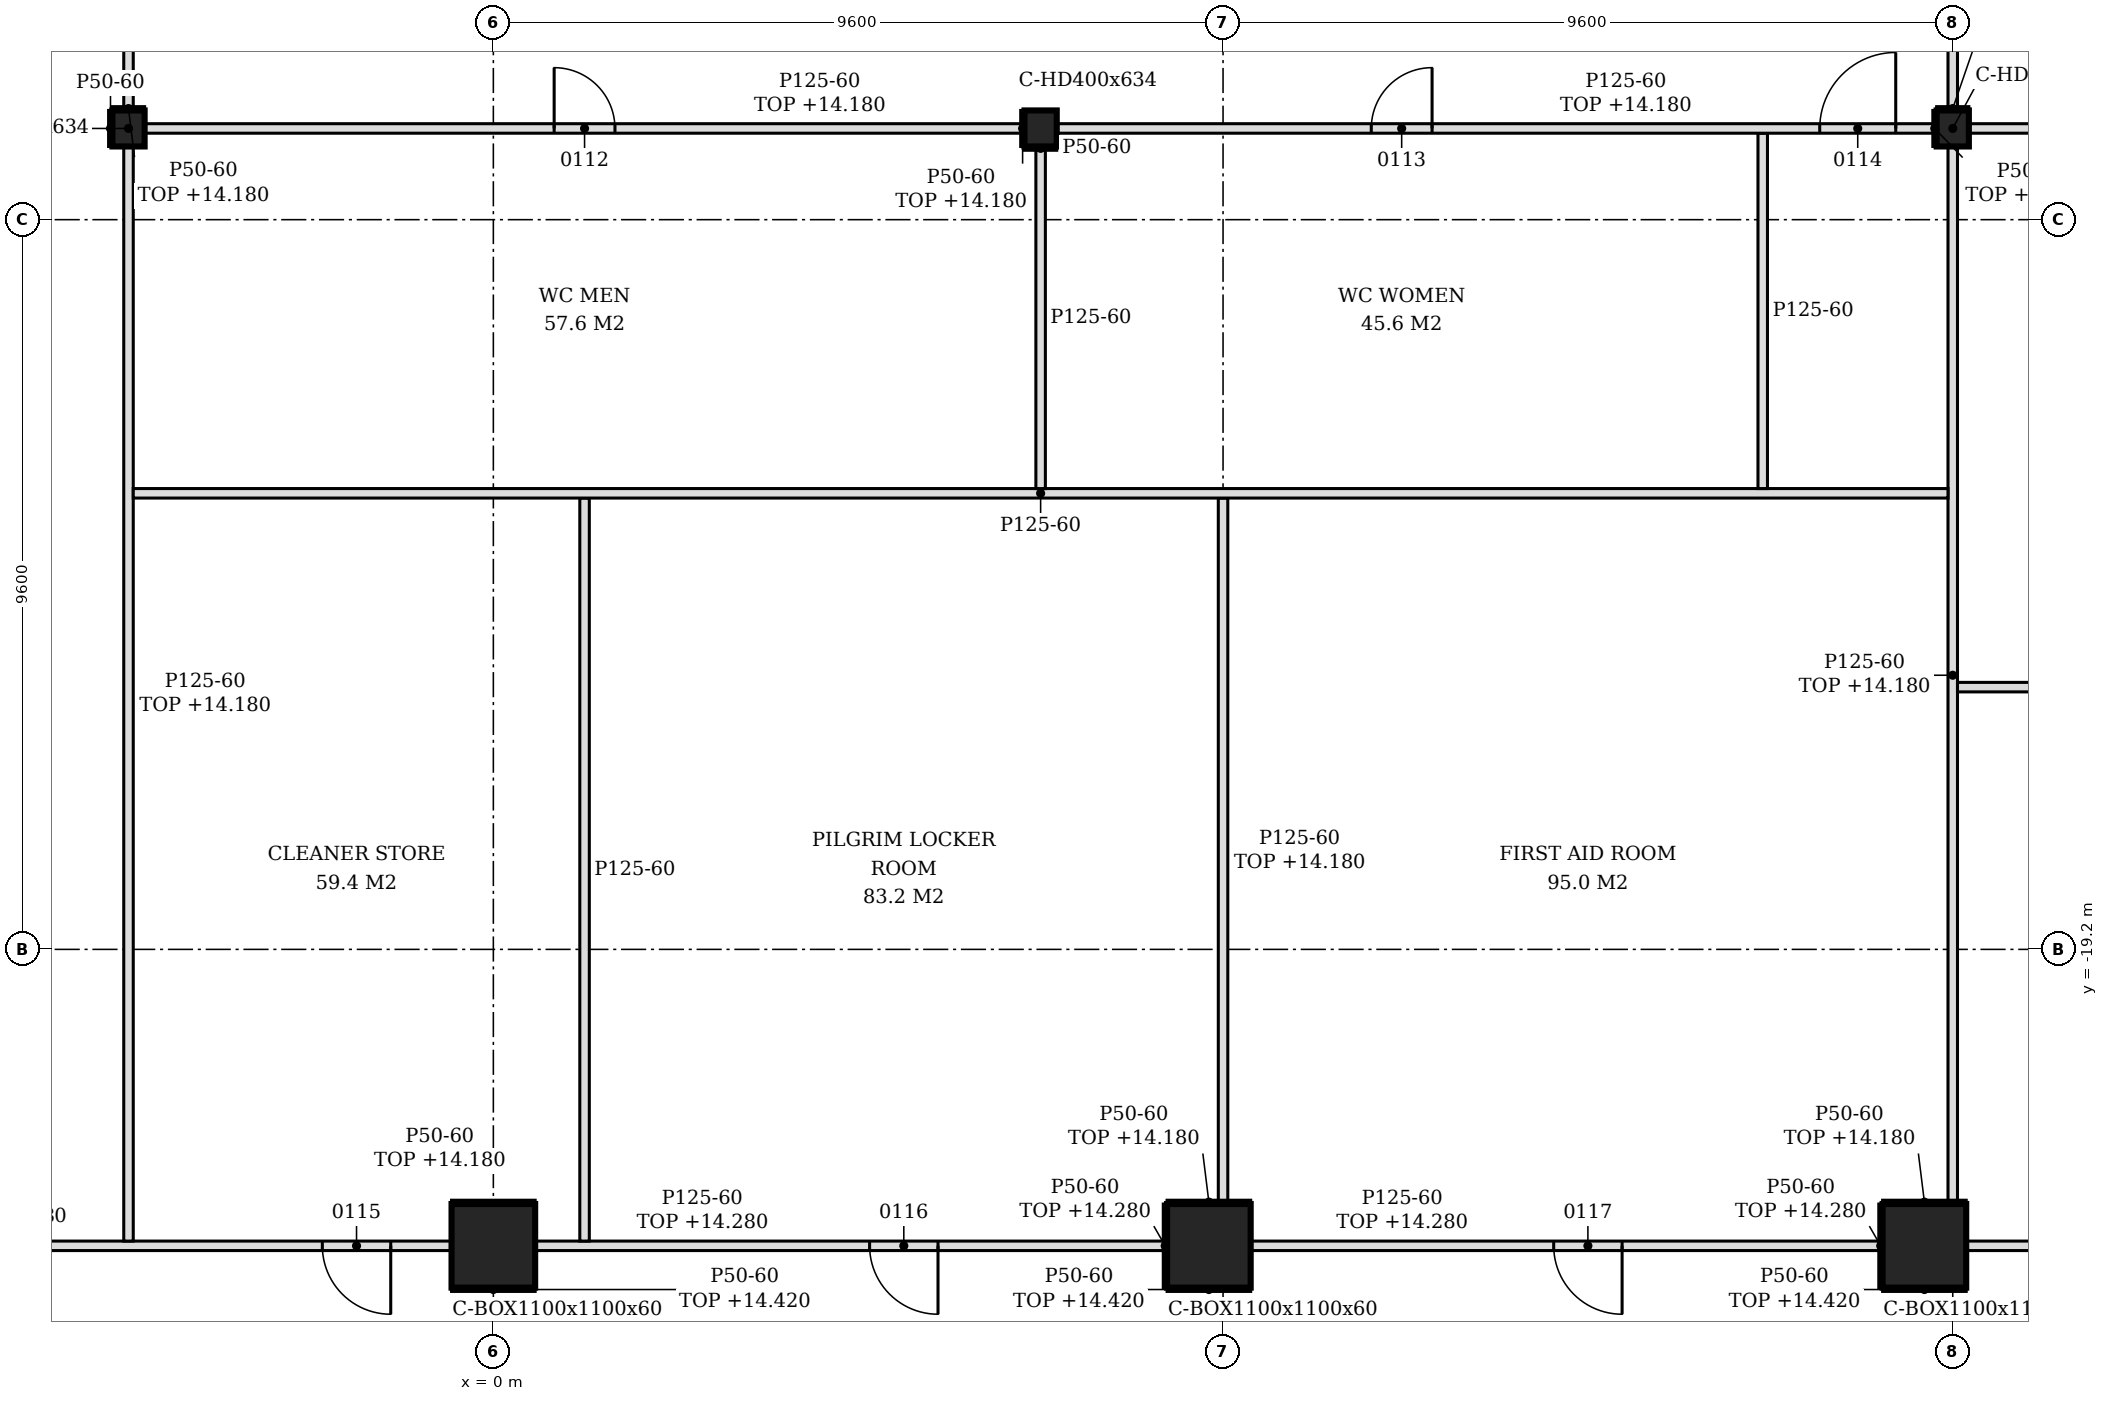
"""IFC4 building model, lengths in metres.
Left out: names, types, materials, properties, quantities, classifications, styles, units other than length and angle.
Written with IfcOpenShell. Run it as: python <this file> out.ifc"""

import sys

from ifc_helpers import new_model, si_unit, direction, frame, frame_2d, origin, origin_2d, place, context, subcontext, project, spatial, polyline, rectangle, hollow_rectangle, i_section, outline, extrude, element, fill, save


model = new_model("IFC4")
c1 = context("Model", 3, precision=1e-05, world=origin(), true_north=direction((0.0, 1.0)))
c2 = subcontext(c1, "Body", "Model", "MODEL_VIEW")
j1 = project(units=[si_unit("LENGTHUNIT", "METRE"), si_unit("PLANEANGLEUNIT", "RADIAN")], contexts=[c1])
p1 = place(None, origin())
s1 = spatial("IfcSite", under=j1, at=p1, CompositionType="ELEMENT")
p2 = place(p1, origin())
s2 = spatial("IfcBuilding", under=s1, at=p2, CompositionType="ELEMENT")
p3 = place(p2, frame((0.0, 0.0, 9.0)))
s3 = spatial("IfcBuildingStorey", under=s2, at=p3, CompositionType="ELEMENT", Elevation=9.0)
for number, where, z_axis, x_axis in (
    (1, (0.0, -23.1, -0.2), (0.0, 0.0, 1.0), (1.0, 0.0, 0.0)),
    (2, (9.414, -23.1, -0.2), (0.0, 0.0, 1.0), (1.0, 0.0, 0.0)),
    (3, (18.827, -23.1, -0.2), (0.0, 0.0, 1.0), (1.0, 0.0, 0.0)),
):
    element("IfcColumn", number, at=place(p3, frame(where, z_axis=z_axis, x_axis=x_axis)), inside=s3, PredefinedType="COLUMN", context=c2, shape_type="SweptSolid", body=[
        extrude(hollow_rectangle(XDim=1.1, YDim=1.1, WallThickness=0.06, at=origin_2d()), origin(), (0.0, 0.0, 1.0), 6.0),
    ])
for number, where, z_axis, x_axis in (
    (4, (-4.8, -8.4, -0.2), (0.0, 0.0, 1.0), (1.0, 0.0, 0.0)),
    (5, (7.2, -8.4, -0.2), (0.0, 0.0, 1.0), (1.0, 0.0, 0.0)),
    (6, (19.2, -8.4, -0.2), (0.0, 0.0, 1.0), (1.0, 0.0, 0.0)),
):
    element("IfcColumn", number, at=place(p3, frame(where, z_axis=z_axis, x_axis=x_axis)), inside=s3, PredefinedType="COLUMN", context=c2, shape_type="SweptSolid", body=[
        extrude(i_section(OverallWidth=0.424, OverallDepth=0.474, WebThickness=0.048, FlangeThickness=0.077, FilletRadius=0.015, at=origin_2d()), origin(), (0.0, 0.0, 1.0), 6.0),
    ])
p4 = place(p3, frame((-8.864, -23.1, 0.0), z_axis=(0.0, 0.0, 1.0), x_axis=(1.0, 0.0, 0.0)))
e7 = element("IfcWall", 7, at=p4, inside=s3, PredefinedType="PARTITIONING", context=c2, shape_type="SweptSolid", body=[
    extrude(rectangle(XDim=8.313, YDim=0.125, at=frame_2d((4.157, 0.0))), origin(), (0.0, 0.0, 1.0), 5.28),
])
p5 = place(p4, frame((6.614, 0.0, 0.0)))
e8 = element("IfcOpeningElement", 8, at=p5, cuts=e7, PredefinedType="OPENING", context=c2, shape_type="SweptSolid", body=[
    extrude(rectangle(XDim=0.9, YDim=2.1, at=frame_2d((0.45, 1.05))), frame((0.0, 0.073, 0.0), z_axis=(0.0, -1.0, 0.0), x_axis=(1.0, 0.0, 0.0)), (0.0, 0.0, 1.0), 0.145),
])
p6 = place(p3, frame((0.55, -23.1, 0.0), z_axis=(0.0, 0.0, 1.0), x_axis=(1.0, 0.0, 0.0)))
e9 = element("IfcWall", 9, at=p6, inside=s3, PredefinedType="PARTITIONING", context=c2, shape_type="SweptSolid", body=[
    extrude(rectangle(XDim=8.313, YDim=0.125, at=frame_2d((4.157, 0.0))), origin(), (0.0, 0.0, 1.0), 5.28),
])
p7 = place(p6, frame((4.4, 0.0, 0.0)))
e10 = element("IfcOpeningElement", 10, at=p7, cuts=e9, PredefinedType="OPENING", context=c2, shape_type="SweptSolid", body=[
    extrude(rectangle(XDim=0.9, YDim=2.1, at=frame_2d((0.45, 1.05))), frame((0.0, 0.073, 0.0), z_axis=(0.0, -1.0, 0.0), x_axis=(1.0, 0.0, 0.0)), (0.0, 0.0, 1.0), 0.145),
])
p8 = place(p3, frame((9.964, -23.1, 0.0), z_axis=(0.0, 0.0, 1.0), x_axis=(1.0, 0.0, 0.0)))
e11 = element("IfcWall", 11, at=p8, inside=s3, PredefinedType="PARTITIONING", context=c2, shape_type="SweptSolid", body=[
    extrude(rectangle(XDim=8.313, YDim=0.125, at=frame_2d((4.157, 0.0))), origin(), (0.0, 0.0, 1.0), 5.28),
])
p9 = place(p8, frame((3.986, 0.0, 0.0)))
e12 = element("IfcOpeningElement", 12, at=p9, cuts=e11, PredefinedType="OPENING", context=c2, shape_type="SweptSolid", body=[
    extrude(rectangle(XDim=0.9, YDim=2.1, at=frame_2d((0.45, 1.05))), frame((0.0, 0.073, 0.0), z_axis=(0.0, -1.0, 0.0), x_axis=(1.0, 0.0, 0.0)), (0.0, 0.0, 1.0), 0.145),
])
p10 = place(p3, frame((19.377, -23.1, 0.0), z_axis=(0.0, 0.0, 1.0), x_axis=(1.0, 0.0, 0.0)))
e13 = element("IfcWall", 13, at=p10, inside=s3, PredefinedType="PARTITIONING", context=c2, shape_type="SweptSolid", body=[
    extrude(rectangle(XDim=8.585, YDim=0.125, at=frame_2d((4.292, 0.0))), origin(), (0.0, 0.0, 1.0), 5.8),
])
p11 = place(p3, frame((-4.8, -23.038, 0.0), z_axis=(0.0, 0.0, 1.0), x_axis=(0.0, 1.0, 0.0)))
e14 = element("IfcWall", 14, at=p11, inside=s3, PredefinedType="PARTITIONING", context=c2, shape_type="SweptSolid", body=[
    extrude(rectangle(XDim=14.401, YDim=0.125, at=frame_2d((7.2, 0.0))), origin(), (0.0, 0.0, 1.0), 5.18),
])
p12 = place(p3, frame((1.2, -23.038, 0.0), z_axis=(0.0, 0.0, 1.0), x_axis=(0.0, 1.0, 0.0)))
e15 = element("IfcWall", 15, at=p12, inside=s3, PredefinedType="PARTITIONING", context=c2, shape_type="SweptSolid", body=[
    extrude(outline(polyline([(0.0, 0.0), (9.775, 0.0), (9.775, 5.8), (0.087, 5.8), (0.085, 5.28), (0.0, 5.28), (0.0, 0.0)])), frame((0.0, 0.062, 0.0), z_axis=(0.0, -1.0, 0.0), x_axis=(1.0, 0.0, 0.0)), (0.0, 0.0, 1.0), 0.125),
])
p13 = place(p3, frame((9.6, -22.55, 0.0), z_axis=(0.0, 0.0, 1.0), x_axis=(0.0, 1.0, 0.0)))
e16 = element("IfcWall", 16, at=p13, inside=s3, PredefinedType="PARTITIONING", context=c2, shape_type="SweptSolid", body=[
    extrude(rectangle(XDim=9.288, YDim=0.125, at=frame_2d((4.644, 0.0))), origin(), (0.0, 0.0, 1.0), 5.18),
])
p14 = place(p3, frame((19.2, -22.55, 0.0), z_axis=(0.0, 0.0, 1.0), x_axis=(0.0, 1.0, 0.0)))
e17 = element("IfcWall", 17, at=p14, inside=s3, PredefinedType="PARTITIONING", context=c2, shape_type="SweptSolid", body=[
    extrude(rectangle(XDim=13.913, YDim=0.125, at=frame_2d((6.957, 0.0))), origin(), (0.0, 0.0, 1.0), 5.18),
])
p15 = place(p3, frame((19.262, -15.75, 0.0), z_axis=(0.0, 0.0, 1.0), x_axis=(1.0, 0.0, 0.0)))
e18 = element("IfcWall", 18, at=p15, inside=s3, PredefinedType="PARTITIONING", context=c2, shape_type="SweptSolid", body=[
    extrude(outline(polyline([(0.0, 0.0), (8.575, 0.0), (8.575, 5.8), (7.189, 5.8), (7.187, 5.28), (6.64, 5.28), (6.638, 5.8), (0.087, 5.8), (0.085, 5.18), (0.0, 5.18), (0.0, 0.0)])), frame((0.0, 0.062, 0.0), z_axis=(0.0, -1.0, 0.0), x_axis=(1.0, 0.0, 0.0)), (0.0, 0.0, 1.0), 0.125),
])
p16 = place(p3, frame((-4.738, -13.2, 0.0), z_axis=(0.0, 0.0, 1.0), x_axis=(1.0, 0.0, 0.0)))
e19 = element("IfcWall", 19, at=p16, inside=s3, PredefinedType="PARTITIONING", context=c2, shape_type="SweptSolid", body=[
    extrude(outline(polyline([(0.0, 0.0), (23.875, 0.0), (23.875, 5.18), (23.788, 5.18), (23.785, 5.8), (19.288, 5.8), (19.285, 5.18), (18.988, 5.18), (18.986, 5.8), (14.488, 5.8), (14.486, 5.18), (14.188, 5.18), (14.186, 5.8), (9.688, 5.8), (9.686, 5.18), (9.387, 5.18), (9.385, 5.8), (4.887, 5.8), (4.885, 5.18), (4.587, 5.18), (4.585, 5.8), (0.087, 5.8), (0.085, 5.18), (0.0, 5.18), (0.0, 0.0)])), frame((0.0, 0.062, 0.0), z_axis=(0.0, -1.0, 0.0), x_axis=(1.0, 0.0, 0.0)), (0.0, 0.0, 1.0), 0.125),
])
p17 = place(p3, frame((7.2, -13.137, 0.0), z_axis=(0.0, 0.0, 1.0), x_axis=(0.0, 1.0, 0.0)))
e20 = element("IfcWall", 20, at=p17, inside=s3, PredefinedType="PARTITIONING", context=c2, shape_type="SweptSolid", body=[
    extrude(rectangle(XDim=4.5, YDim=0.125, at=frame_2d((2.25, 0.0))), origin(), (0.0, 0.0, 1.0), 5.8),
])
p18 = place(p3, frame((16.7, -13.137, 0.0), z_axis=(0.0, 0.0, 1.0), x_axis=(0.0, 1.0, 0.0)))
e21 = element("IfcWall", 21, at=p18, inside=s3, PredefinedType="PARTITIONING", context=c2, shape_type="SweptSolid", body=[
    extrude(outline(polyline([(0.0, 0.0), (4.675, 0.0), (4.675, 5.18), (4.587, 5.18), (4.585, 5.8), (0.0, 5.8), (0.0, 0.0)])), frame((0.0, 0.062, 0.0), z_axis=(0.0, -1.0, 0.0), x_axis=(1.0, 0.0, 0.0)), (0.0, 0.0, 1.0), 0.125),
])
p19 = place(p3, frame((-4.588, -8.4, 0.0), z_axis=(0.0, 0.0, 1.0), x_axis=(1.0, 0.0, 0.0)))
e22 = element("IfcWall", 22, at=p19, inside=s3, PredefinedType="PARTITIONING", context=c2, shape_type="SweptSolid", body=[
    extrude(rectangle(XDim=11.576, YDim=0.125, at=frame_2d((5.788, 0.0))), origin(), (0.0, 0.0, 1.0), 5.18),
])
p20 = place(p19, frame((5.388, 0.0, 0.0)))
e23 = element("IfcOpeningElement", 23, at=p20, cuts=e22, PredefinedType="OPENING", context=c2, shape_type="SweptSolid", body=[
    extrude(rectangle(XDim=0.8, YDim=2.1, at=frame_2d((0.4, 1.05))), frame((0.0, 0.073, 0.0), z_axis=(0.0, -1.0, 0.0), x_axis=(1.0, 0.0, 0.0)), (0.0, 0.0, 1.0), 0.145),
])
p21 = place(p3, frame((7.412, -8.4, 0.0), z_axis=(0.0, 0.0, 1.0), x_axis=(1.0, 0.0, 0.0)))
e24 = element("IfcWall", 24, at=p21, inside=s3, PredefinedType="PARTITIONING", context=c2, shape_type="SweptSolid", body=[
    extrude(rectangle(XDim=11.576, YDim=0.125, at=frame_2d((5.788, 0.0))), origin(), (0.0, 0.0, 1.0), 5.18),
])
p22 = place(p21, frame((4.138, 0.0, 0.0)))
e25 = element("IfcOpeningElement", 25, at=p22, cuts=e24, PredefinedType="OPENING", context=c2, shape_type="SweptSolid", body=[
    extrude(rectangle(XDim=0.8, YDim=2.1, at=frame_2d((0.4, 1.05))), frame((0.0, 0.073, 0.0), z_axis=(0.0, -1.0, 0.0), x_axis=(1.0, 0.0, 0.0)), (0.0, 0.0, 1.0), 0.145),
])
p23 = place(p21, frame((10.038, 0.0, 0.0)))
e26 = element("IfcOpeningElement", 26, at=p23, cuts=e24, PredefinedType="OPENING", context=c2, shape_type="SweptSolid", body=[
    extrude(rectangle(XDim=1.0, YDim=2.1, at=frame_2d((0.5, 1.05))), frame((0.0, 0.073, 0.0), z_axis=(0.0, -1.0, 0.0), x_axis=(1.0, 0.0, 0.0)), (0.0, 0.0, 1.0), 0.145),
])
p24 = place(p3, frame((19.412, -8.4, 0.0), z_axis=(0.0, 0.0, 1.0), x_axis=(1.0, 0.0, 0.0)))
e27 = element("IfcWall", 27, at=p24, inside=s3, PredefinedType="PARTITIONING", context=c2, shape_type="SweptSolid", body=[
    extrude(outline(polyline([(0.0, 0.0), (8.425, 0.0), (8.426, 5.28), (8.338, 5.28), (8.336, 5.8), (0.0, 5.8), (0.0, 0.0)])), frame((0.0, 0.062, 0.0), z_axis=(0.0, -1.0, 0.0), x_axis=(1.0, 0.0, 0.0)), (0.0, 0.0, 1.0), 0.125),
])
for number, where, z_axis, x_axis in (
    (28, (-4.8, -8.163, 0.0), (0.0, 0.0, 1.0), (0.0, 1.0, 0.0)),
    (29, (19.2, -8.163, 0.0), (0.0, 0.0, 1.0), (0.0, 1.0, 0.0)),
):
    element("IfcWall", number, at=place(p3, frame(where, z_axis=z_axis, x_axis=x_axis)), inside=s3, PredefinedType="PARTITIONING", context=c2, shape_type="SweptSolid", body=[
        extrude(rectangle(XDim=10.326, YDim=0.125, at=frame_2d((5.163, 0.0))), origin(), (0.0, 0.0, 1.0), 5.18),
    ])
p25 = place(p3, frame((-0.55, -22.525, 0.0), z_axis=(0.0, 0.0, 1.0), x_axis=(1.0, 0.0, 0.0)))
e30 = element("IfcWall", 30, at=p25, inside=s3, PredefinedType="PARTITIONING", context=c2, shape_type="SweptSolid", body=[
    extrude(rectangle(XDim=1.1, YDim=0.05, at=frame_2d((0.55, 0.0))), origin(), (0.0, 0.0, 1.0), 5.18),
])
p26 = place(p3, frame((-0.55, -23.675, 0.0), z_axis=(0.0, 0.0, 1.0), x_axis=(1.0, 0.0, 0.0)))
e31 = element("IfcWall", 31, at=p26, inside=s3, PredefinedType="PARTITIONING", context=c2, shape_type="SweptSolid", body=[
    extrude(rectangle(XDim=1.1, YDim=0.05, at=frame_2d((0.55, 0.0))), origin(), (0.0, 0.0, 1.0), 5.42),
])
p27 = place(p3, frame((8.864, -22.525, 0.0), z_axis=(0.0, 0.0, 1.0), x_axis=(1.0, 0.0, 0.0)))
e32 = element("IfcWall", 32, at=p27, inside=s3, PredefinedType="PARTITIONING", context=c2, shape_type="SweptSolid", body=[
    extrude(rectangle(XDim=1.1, YDim=0.05, at=frame_2d((0.55, 0.0))), origin(), (0.0, 0.0, 1.0), 5.18),
])
p28 = place(p3, frame((8.864, -23.675, 0.0), z_axis=(0.0, 0.0, 1.0), x_axis=(1.0, 0.0, 0.0)))
e33 = element("IfcWall", 33, at=p28, inside=s3, PredefinedType="PARTITIONING", context=c2, shape_type="SweptSolid", body=[
    extrude(rectangle(XDim=1.1, YDim=0.05, at=frame_2d((0.55, 0.0))), origin(), (0.0, 0.0, 1.0), 5.42),
])
p29 = place(p3, frame((18.277, -22.525, 0.0), z_axis=(0.0, 0.0, 1.0), x_axis=(1.0, 0.0, 0.0)))
e34 = element("IfcWall", 34, at=p29, inside=s3, PredefinedType="PARTITIONING", context=c2, shape_type="SweptSolid", body=[
    extrude(rectangle(XDim=1.1, YDim=0.05, at=frame_2d((0.55, 0.0))), origin(), (0.0, 0.0, 1.0), 5.18),
])
p30 = place(p3, frame((18.277, -23.675, 0.0), z_axis=(0.0, 0.0, 1.0), x_axis=(1.0, 0.0, 0.0)))
e35 = element("IfcWall", 35, at=p30, inside=s3, PredefinedType="PARTITIONING", context=c2, shape_type="SweptSolid", body=[
    extrude(rectangle(XDim=1.1, YDim=0.05, at=frame_2d((0.55, 0.0))), origin(), (0.0, 0.0, 1.0), 5.42),
])
p31 = place(p3, frame((-5.037, -8.637, 0.0), z_axis=(0.0, 0.0, 1.0), x_axis=(0.0, 1.0, 0.0)))
e36 = element("IfcWall", 36, at=p31, inside=s3, PredefinedType="PARTITIONING", context=c2, shape_type="SweptSolid", body=[
    extrude(rectangle(XDim=0.474, YDim=0.05, at=frame_2d((0.237, 0.0))), origin(), (0.0, 0.0, 1.0), 5.8),
])
for number, where, z_axis, x_axis in (
    (37, (8.839, -23.65, 0.0), (0.0, 0.0, 1.0), (0.0, 1.0, 0.0)),
    (38, (18.252, -23.65, 0.0), (0.0, 0.0, 1.0), (0.0, 1.0, 0.0)),
):
    element("IfcWall", number, at=place(p3, frame(where, z_axis=z_axis, x_axis=x_axis)), inside=s3, PredefinedType="PARTITIONING", context=c2, shape_type="SweptSolid", body=[
        extrude(rectangle(XDim=1.1, YDim=0.05, at=frame_2d((0.55, 0.0))), origin(), (0.0, 0.0, 1.0), 5.28),
    ])
for number, where, z_axis, x_axis in (
    (39, (18.963, -8.637, 0.0), (0.0, 0.0, 1.0), (0.0, 1.0, 0.0)),
    (40, (6.963, -8.637, 0.0), (0.0, 0.0, 1.0), (0.0, 1.0, 0.0)),
):
    element("IfcWall", number, at=place(p3, frame(where, z_axis=z_axis, x_axis=x_axis)), inside=s3, PredefinedType="PARTITIONING", context=c2, shape_type="SweptSolid", body=[
        extrude(rectangle(XDim=0.474, YDim=0.05, at=frame_2d((0.237, 0.0))), origin(), (0.0, 0.0, 1.0), 5.18),
    ])
p32 = place(p3, frame((-5.012, -8.138, 0.0), z_axis=(0.0, 0.0, 1.0), x_axis=(1.0, 0.0, 0.0)))
e41 = element("IfcWall", 41, at=p32, inside=s3, PredefinedType="PARTITIONING", context=c2, shape_type="SweptSolid", body=[
    extrude(rectangle(XDim=0.424, YDim=0.05, at=frame_2d((0.212, 0.0))), origin(), (0.0, 0.0, 1.0), 5.18),
])
p33 = place(p3, frame((6.988, -8.662, 0.0), z_axis=(0.0, 0.0, 1.0), x_axis=(1.0, 0.0, 0.0)))
e42 = element("IfcWall", 42, at=p33, inside=s3, PredefinedType="PARTITIONING", context=c2, shape_type="SweptSolid", body=[
    extrude(rectangle(XDim=0.424, YDim=0.05, at=frame_2d((0.212, 0.0))), origin(), (0.0, 0.0, 1.0), 5.8),
])
p34 = place(p3, frame((18.988, -8.138, 0.0), z_axis=(0.0, 0.0, 1.0), x_axis=(1.0, 0.0, 0.0)))
e43 = element("IfcWall", 43, at=p34, inside=s3, PredefinedType="PARTITIONING", context=c2, shape_type="SweptSolid", body=[
    extrude(rectangle(XDim=0.424, YDim=0.05, at=frame_2d((0.212, 0.0))), origin(), (0.0, 0.0, 1.0), 5.18),
])
p35 = place(p20, origin())
e44 = element("IfcDoor", 44, at=p35, inside=s3, OperationType="SINGLE_SWING_LEFT", PredefinedType="DOOR", context=c2, shape_type="SweptSolid", body=[
    extrude(rectangle(XDim=0.8, YDim=2.1, at=frame_2d((0.4, 1.05))), frame((0.0, 0.025, 0.0), z_axis=(0.0, -1.0, 0.0), x_axis=(1.0, 0.0, 0.0)), (0.0, 0.0, 1.0), 0.05),
])
fill(e23, e44)
p36 = place(p22, origin())
e45 = element("IfcDoor", 45, at=p36, inside=s3, OperationType="SINGLE_SWING_RIGHT", PredefinedType="DOOR", context=c2, shape_type="SweptSolid", body=[
    extrude(rectangle(XDim=0.8, YDim=2.1, at=frame_2d((0.4, 1.05))), frame((0.0, 0.025, 0.0), z_axis=(0.0, -1.0, 0.0), x_axis=(1.0, 0.0, 0.0)), (0.0, 0.0, 1.0), 0.05),
])
fill(e25, e45)
p37 = place(p23, origin())
e46 = element("IfcDoor", 46, at=p37, inside=s3, OperationType="SINGLE_SWING_RIGHT", PredefinedType="DOOR", context=c2, shape_type="SweptSolid", body=[
    extrude(rectangle(XDim=1.0, YDim=2.1, at=frame_2d((0.5, 1.05))), frame((0.0, 0.025, 0.0), z_axis=(0.0, -1.0, 0.0), x_axis=(1.0, 0.0, 0.0)), (0.0, 0.0, 1.0), 0.05),
])
fill(e26, e46)
p38 = place(p5, frame((0.9, 0.0, 0.0), z_axis=(0.0, 0.0, 1.0), x_axis=(-1.0, 0.0, 0.0)))
e47 = element("IfcDoor", 47, at=p38, inside=s3, OperationType="SINGLE_SWING_LEFT", PredefinedType="DOOR", context=c2, shape_type="SweptSolid", body=[
    extrude(rectangle(XDim=0.9, YDim=2.1, at=frame_2d((0.45, 1.05))), frame((0.0, 0.025, 0.0), z_axis=(0.0, -1.0, 0.0), x_axis=(1.0, 0.0, 0.0)), (0.0, 0.0, 1.0), 0.05),
])
fill(e8, e47)
p39 = place(p7, frame((0.9, 0.0, 0.0), z_axis=(0.0, 0.0, 1.0), x_axis=(-1.0, 0.0, 0.0)))
e48 = element("IfcDoor", 48, at=p39, inside=s3, OperationType="SINGLE_SWING_LEFT", PredefinedType="DOOR", context=c2, shape_type="SweptSolid", body=[
    extrude(rectangle(XDim=0.9, YDim=2.1, at=frame_2d((0.45, 1.05))), frame((0.0, 0.025, 0.0), z_axis=(0.0, -1.0, 0.0), x_axis=(1.0, 0.0, 0.0)), (0.0, 0.0, 1.0), 0.05),
])
fill(e10, e48)
p40 = place(p9, frame((0.9, 0.0, 0.0), z_axis=(0.0, 0.0, 1.0), x_axis=(-1.0, 0.0, 0.0)))
e49 = element("IfcDoor", 49, at=p40, inside=s3, OperationType="SINGLE_SWING_LEFT", PredefinedType="DOOR", context=c2, shape_type="SweptSolid", body=[
    extrude(rectangle(XDim=0.9, YDim=2.1, at=frame_2d((0.45, 1.05))), frame((0.0, 0.025, 0.0), z_axis=(0.0, -1.0, 0.0), x_axis=(1.0, 0.0, 0.0)), (0.0, 0.0, 1.0), 0.05),
])
fill(e12, e49)
save(model, sys.argv[1])
